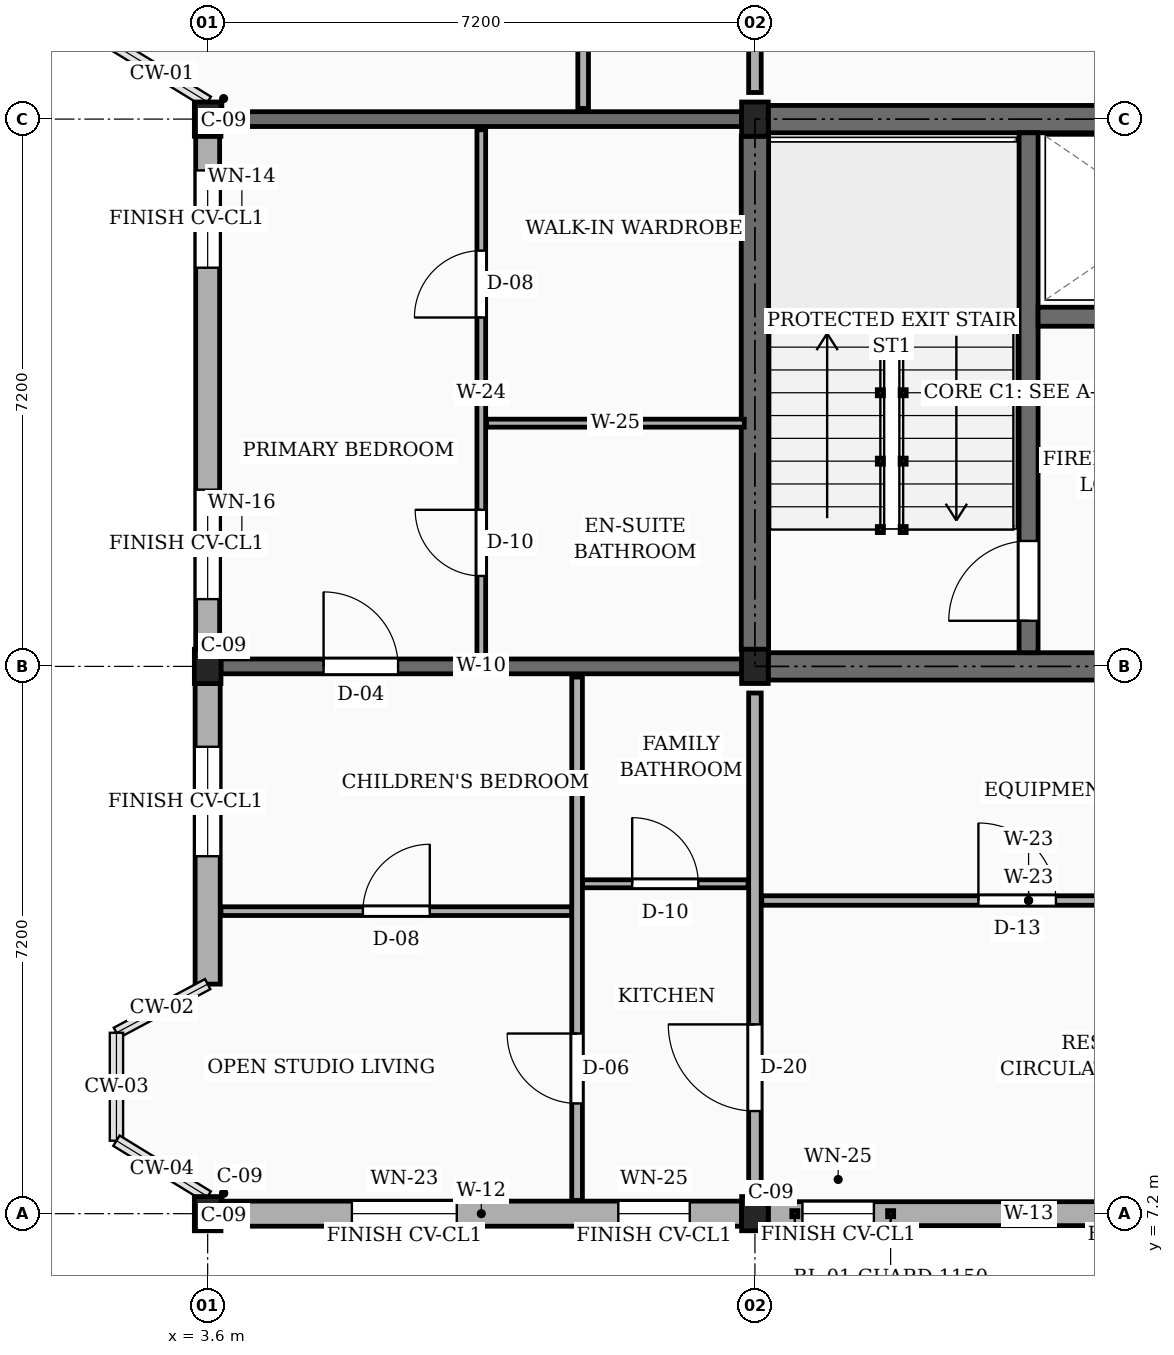
"""IFC4 building model, lengths in metres.
Left out: names, types, materials, properties, quantities, classifications, styles, units other than length and angle.
Written with IfcOpenShell. Run it as: python <this file> out.ifc"""

import sys

from ifc_helpers import new_model, si_unit, direction, frame, frame_2d, origin, origin_2d, place, context, subcontext, project, spatial, rectangle, extrude, element, fill, save


model = new_model("IFC4")
c1 = context("Model", 3, precision=1e-05, world=origin(), true_north=direction((0.0, 1.0)))
c2 = subcontext(c1, "Body", "Model", "MODEL_VIEW")
j1 = project(units=[si_unit("LENGTHUNIT", "METRE"), si_unit("PLANEANGLEUNIT", "RADIAN")], contexts=[c1])
p1 = place(None, origin())
s1 = spatial("IfcSite", under=j1, at=p1, CompositionType="ELEMENT")
p2 = place(p1, origin())
s2 = spatial("IfcBuilding", under=s1, at=p2, CompositionType="ELEMENT")
p3 = place(p2, frame((0.0, 0.0, 45.45)))
s3 = spatial("IfcBuildingStorey", under=s2, at=p3, CompositionType="ELEMENT", Elevation=45.45)
for number, where, z_axis, x_axis in (
    (1, (3.6, 7.2, 0.0), (0.0, 0.0, 1.0), (1.0, 0.0, 0.0)),
    (2, (3.6, 14.4, 0.0), (0.0, 0.0, 1.0), (1.0, 0.0, 0.0)),
    (3, (3.6, 21.6, 0.0), (0.0, 0.0, 1.0), (1.0, 0.0, 0.0)),
    (4, (10.8, 7.2, 0.0), (0.0, 0.0, 1.0), (1.0, 0.0, 0.0)),
    (5, (10.8, 14.4, 0.0), (0.0, 0.0, 1.0), (1.0, 0.0, 0.0)),
    (6, (10.8, 21.6, 0.0), (0.0, 0.0, 1.0), (1.0, 0.0, 0.0)),
):
    element("IfcColumn", number, at=place(p3, frame(where, z_axis=z_axis, x_axis=x_axis)), inside=s3, PredefinedType="COLUMN", context=c2, shape_type="SweptSolid", body=[
        extrude(rectangle(XDim=0.35, YDim=0.45, at=origin_2d()), origin(), (0.0, 0.0, 1.0), 3.15),
    ])
p4 = place(p3, frame((3.775, 14.4, 0.0), z_axis=(0.0, 0.0, 1.0), x_axis=(1.0, 0.0, 0.0)))
e7 = element("IfcWall", 7, at=p4, inside=s3, PredefinedType="SOLIDWALL", context=c2, shape_type="SweptSolid", body=[
    extrude(rectangle(XDim=6.85, YDim=0.195, at=frame_2d((3.425, 0.0))), origin(), (0.0, 0.0, 1.0), 2.17),
])
p5 = place(p4, frame((1.35, 0.0, 0.0)))
e8 = element("IfcOpeningElement", 8, at=p5, cuts=e7, PredefinedType="OPENING", context=c2, shape_type="SweptSolid", body=[
    extrude(rectangle(XDim=0.98, YDim=2.12, at=frame_2d((0.49, 1.06))), frame((0.0, 0.107, 0.0), z_axis=(0.0, -1.0, 0.0), x_axis=(1.0, 0.0, 0.0)), (0.0, 0.0, 1.0), 0.215),
])
p6 = place(p3, frame((3.775, 21.6, 0.0), z_axis=(0.0, 0.0, 1.0), x_axis=(1.0, 0.0, 0.0)))
e9 = element("IfcWall", 9, at=p6, inside=s3, PredefinedType="SOLIDWALL", context=c2, shape_type="SweptSolid", body=[
    extrude(rectangle(XDim=6.85, YDim=0.195, at=frame_2d((3.425, 0.0))), origin(), (0.0, 0.0, 1.0), 2.17),
])
p7 = place(p3, frame((3.775, 7.2, 0.0), z_axis=(0.0, 0.0, 1.0), x_axis=(1.0, 0.0, 0.0)))
e10 = element("IfcWall", 10, at=p7, inside=s3, PredefinedType="SOLIDWALL", context=c2, shape_type="SweptSolid", body=[
    extrude(rectangle(XDim=6.85, YDim=0.33, at=frame_2d((3.425, 0.0))), origin(), (0.0, 0.0, 1.0), 2.44),
])
p8 = place(p7, frame((1.722, 0.0, 0.78)))
e11 = element("IfcOpeningElement", 11, at=p8, cuts=e10, PredefinedType="OPENING", context=c2, shape_type="SweptSolid", body=[
    extrude(rectangle(XDim=1.38, YDim=1.36, at=frame_2d((0.69, 0.68))), frame((0.0, 0.175, 0.0), z_axis=(0.0, -1.0, 0.0), x_axis=(1.0, 0.0, 0.0)), (0.0, 0.0, 1.0), 0.35),
])
p9 = place(p7, frame((5.228, 0.0, 0.78)))
e12 = element("IfcOpeningElement", 12, at=p9, cuts=e10, PredefinedType="OPENING", context=c2, shape_type="SweptSolid", body=[
    extrude(rectangle(XDim=0.94, YDim=1.44, at=frame_2d((0.47, 0.72))), frame((0.0, 0.175, 0.0), z_axis=(0.0, -1.0, 0.0), x_axis=(1.0, 0.0, 0.0)), (0.0, 0.0, 1.0), 0.35),
])
p10 = place(p3, frame((10.975, 7.2, 0.0), z_axis=(0.0, 0.0, 1.0), x_axis=(1.0, 0.0, 0.0)))
e13 = element("IfcWall", 13, at=p10, inside=s3, PredefinedType="SOLIDWALL", context=c2, shape_type="SweptSolid", body=[
    extrude(rectangle(XDim=6.85, YDim=0.315, at=frame_2d((3.425, 0.0))), origin(), (0.0, 0.0, 1.0), 2.44),
])
p11 = place(p10, frame((0.45, 0.0, 0.78)))
e14 = element("IfcOpeningElement", 14, at=p11, cuts=e13, PredefinedType="OPENING", context=c2, shape_type="SweptSolid", body=[
    extrude(rectangle(XDim=0.94, YDim=1.44, at=frame_2d((0.47, 0.72))), frame((0.0, 0.167, 0.0), z_axis=(0.0, -1.0, 0.0), x_axis=(1.0, 0.0, 0.0)), (0.0, 0.0, 1.0), 0.335),
])
p12 = place(p10, frame((4.65, 0.0, 0.78)))
e15 = element("IfcOpeningElement", 15, at=p12, cuts=e13, PredefinedType="OPENING", context=c2, shape_type="SweptSolid", body=[
    extrude(rectangle(XDim=1.15, YDim=1.44, at=frame_2d((0.575, 0.72))), frame((0.0, 0.167, 0.0), z_axis=(0.0, -1.0, 0.0), x_axis=(1.0, 0.0, 0.0)), (0.0, 0.0, 1.0), 0.335),
])
p13 = place(p3, frame((3.6, 21.375, 0.0), z_axis=(0.0, 0.0, 1.0), x_axis=(0.0, -1.0, 0.0)))
e16 = element("IfcWall", 16, at=p13, inside=s3, PredefinedType="SOLIDWALL", context=c2, shape_type="SweptSolid", body=[
    extrude(rectangle(XDim=6.75, YDim=0.315, at=frame_2d((3.375, 0.0))), origin(), (0.0, 0.0, 1.0), 2.44),
])
p14 = place(p13, frame((0.45, 0.0, 0.78)))
e17 = element("IfcOpeningElement", 17, at=p14, cuts=e16, PredefinedType="OPENING", context=c2, shape_type="SweptSolid", body=[
    extrude(rectangle(XDim=1.28, YDim=1.26, at=frame_2d((0.64, 0.63))), frame((0.0, 0.167, 0.0), z_axis=(0.0, -1.0, 0.0), x_axis=(1.0, 0.0, 0.0)), (0.0, 0.0, 1.0), 0.335),
])
p15 = place(p13, frame((4.65, 0.0, 0.78)))
e18 = element("IfcOpeningElement", 18, at=p15, cuts=e16, PredefinedType="OPENING", context=c2, shape_type="SweptSolid", body=[
    extrude(rectangle(XDim=1.44, YDim=1.26, at=frame_2d((0.72, 0.63))), frame((0.0, 0.167, 0.0), z_axis=(0.0, -1.0, 0.0), x_axis=(1.0, 0.0, 0.0)), (0.0, 0.0, 1.0), 0.335),
])
p16 = place(p3, frame((3.6, 14.175, 0.0), z_axis=(0.0, 0.0, 1.0), x_axis=(0.0, -1.0, 0.0)))
e19 = element("IfcWall", 19, at=p16, inside=s3, PredefinedType="SOLIDWALL", context=c2, shape_type="SweptSolid", body=[
    extrude(rectangle(XDim=3.955, YDim=0.33, at=frame_2d((1.978, 0.0))), origin(), (0.0, 0.0, 1.0), 2.44),
])
p17 = place(p16, frame((0.833, 0.0, 0.78)))
e20 = element("IfcOpeningElement", 20, at=p17, cuts=e19, PredefinedType="OPENING", context=c2, shape_type="SweptSolid", body=[
    extrude(rectangle(XDim=1.44, YDim=1.26, at=frame_2d((0.72, 0.63))), frame((0.0, 0.175, 0.0), z_axis=(0.0, -1.0, 0.0), x_axis=(1.0, 0.0, 0.0)), (0.0, 0.0, 1.0), 0.35),
])
p18 = place(p3, frame((10.8, 14.625, 0.0), z_axis=(0.0, 0.0, 1.0), x_axis=(0.0, 1.0, 0.0)))
e21 = element("IfcWall", 21, at=p18, inside=s3, PredefinedType="SHEAR", context=c2, shape_type="SweptSolid", body=[
    extrude(rectangle(XDim=6.75, YDim=0.36, at=frame_2d((3.375, 0.0))), origin(), (0.0, 0.0, 1.0), 2.87),
])
for number, where, z_axis, x_axis in (
    (22, (10.975, 21.6, 0.0), (0.0, 0.0, 1.0), (1.0, 0.0, 0.0)),
    (23, (10.975, 14.4, 0.0), (0.0, 0.0, 1.0), (1.0, 0.0, 0.0)),
):
    element("IfcWall", number, at=place(p3, frame(where, z_axis=z_axis, x_axis=x_axis)), inside=s3, PredefinedType="SHEAR", context=c2, shape_type="SweptSolid", body=[
        extrude(rectangle(XDim=6.85, YDim=0.36, at=frame_2d((3.425, 0.0))), origin(), (0.0, 0.0, 1.0), 2.87),
    ])
p19 = place(p3, frame((14.4, 14.58, 0.0), z_axis=(0.0, 0.0, 1.0), x_axis=(0.0, 1.0, 0.0)))
e24 = element("IfcWall", 24, at=p19, inside=s3, PredefinedType="SHEAR", context=c2, shape_type="SweptSolid", body=[
    extrude(rectangle(XDim=6.84, YDim=0.25, at=frame_2d((3.42, 0.0))), origin(), (0.0, 0.0, 1.0), 2.87),
])
p20 = place(p19, frame((0.42, 0.0, 0.0)))
e25 = element("IfcOpeningElement", 25, at=p20, cuts=e24, PredefinedType="OPENING", context=c2, shape_type="SweptSolid", body=[
    extrude(rectangle(XDim=1.05, YDim=2.15, at=frame_2d((0.525, 1.075))), frame((0.0, 0.135, 0.0), z_axis=(0.0, -1.0, 0.0), x_axis=(1.0, 0.0, 0.0)), (0.0, 0.0, 1.0), 0.27),
])
p21 = place(p3, frame((14.525, 19.0, 0.0), z_axis=(0.0, 0.0, 1.0), x_axis=(1.0, 0.0, 0.0)))
e26 = element("IfcWall", 26, at=p21, inside=s3, PredefinedType="SHEAR", context=c2, shape_type="SweptSolid", body=[
    extrude(rectangle(XDim=3.295, YDim=0.25, at=frame_2d((1.647, 0.0))), origin(), (0.0, 0.0, 1.0), 2.87),
])
p22 = place(p21, frame((1.1, 0.0, 0.0)))
e27 = element("IfcOpeningElement", 27, at=p22, cuts=e26, PredefinedType="OPENING", context=c2, shape_type="SweptSolid", body=[
    extrude(rectangle(XDim=1.1, YDim=2.2, at=frame_2d((0.55, 1.1))), frame((0.0, 0.135, 0.0), z_axis=(0.0, -1.0, 0.0), x_axis=(1.0, 0.0, 0.0)), (0.0, 0.0, 1.0), 0.27),
])
p23 = place(p3, frame((10.8, 7.55, 0.0), z_axis=(0.0, 0.0, 1.0), x_axis=(0.0, 1.0, 0.0)))
e28 = element("IfcWall", 28, at=p23, inside=s3, PredefinedType="PARTITIONING", context=c2, shape_type="SweptSolid", body=[
    extrude(rectangle(XDim=6.5, YDim=0.165, at=frame_2d((3.25, 0.0))), origin(), (0.0, 0.0, 1.0), 2.305),
])
p24 = place(p23, frame((1.0, 0.0, 0.0)))
e29 = element("IfcOpeningElement", 29, at=p24, cuts=e28, PredefinedType="OPENING", context=c2, shape_type="SweptSolid", body=[
    extrude(rectangle(XDim=1.14, YDim=2.18, at=frame_2d((0.57, 1.09))), frame((0.0, 0.093, 0.0), z_axis=(0.0, -1.0, 0.0), x_axis=(1.0, 0.0, 0.0)), (0.0, 0.0, 1.0), 0.185),
])
p25 = place(p3, frame((10.8, 21.95, 0.0), z_axis=(0.0, 0.0, 1.0), x_axis=(0.0, 1.0, 0.0)))
e30 = element("IfcWall", 30, at=p25, inside=s3, PredefinedType="PARTITIONING", context=c2, shape_type="SweptSolid", body=[
    extrude(rectangle(XDim=6.5, YDim=0.165, at=frame_2d((3.25, 0.0))), origin(), (0.0, 0.0, 1.0), 2.305),
])
p26 = place(p25, frame((1.0, 0.0, 0.0)))
e31 = element("IfcOpeningElement", 31, at=p26, cuts=e30, PredefinedType="OPENING", context=c2, shape_type="SweptSolid", body=[
    extrude(rectangle(XDim=1.0, YDim=2.15, at=frame_2d((0.5, 1.075))), frame((0.0, 0.093, 0.0), z_axis=(0.0, -1.0, 0.0), x_axis=(1.0, 0.0, 0.0)), (0.0, 0.0, 1.0), 0.185),
])
p27 = place(p3, frame((10.89, 11.32, 0.0), z_axis=(0.0, 0.0, 1.0), x_axis=(1.0, 0.0, 0.0)))
e32 = element("IfcWall", 32, at=p27, inside=s3, PredefinedType="PARTITIONING", context=c2, shape_type="SweptSolid", body=[
    extrude(rectangle(XDim=7.02, YDim=0.125, at=frame_2d((3.51, 0.0))), origin(), (0.0, 0.0, 1.0), 2.305),
])
p28 = place(p27, frame((2.85, 0.0, 0.0)))
e33 = element("IfcOpeningElement", 33, at=p28, cuts=e32, PredefinedType="OPENING", context=c2, shape_type="SweptSolid", body=[
    extrude(rectangle(XDim=1.02, YDim=2.15, at=frame_2d((0.51, 1.075))), frame((0.0, 0.073, 0.0), z_axis=(0.0, -1.0, 0.0), x_axis=(1.0, 0.0, 0.0)), (0.0, 0.0, 1.0), 0.145),
])
p29 = place(p3, frame((3.775, 11.18, 0.0), z_axis=(0.0, 0.0, 1.0), x_axis=(1.0, 0.0, 0.0)))
e34 = element("IfcWall", 34, at=p29, inside=s3, PredefinedType="PARTITIONING", context=c2, shape_type="SweptSolid", body=[
    extrude(rectangle(XDim=4.615, YDim=0.115, at=frame_2d((2.308, 0.0))), origin(), (0.0, 0.0, 1.0), 2.305),
])
p30 = place(p29, frame((1.867, 0.0, 0.0)))
e35 = element("IfcOpeningElement", 35, at=p30, cuts=e34, PredefinedType="OPENING", context=c2, shape_type="SweptSolid", body=[
    extrude(rectangle(XDim=0.88, YDim=2.08, at=frame_2d((0.44, 1.04))), frame((0.0, 0.067, 0.0), z_axis=(0.0, -1.0, 0.0), x_axis=(1.0, 0.0, 0.0)), (0.0, 0.0, 1.0), 0.135),
])
p31 = place(p3, frame((8.53, 11.54, 0.0), z_axis=(0.0, 0.0, 1.0), x_axis=(1.0, 0.0, 0.0)))
e36 = element("IfcWall", 36, at=p31, inside=s3, PredefinedType="PARTITIONING", context=c2, shape_type="SweptSolid", body=[
    extrude(rectangle(XDim=2.18, YDim=0.105, at=frame_2d((1.09, 0.0))), origin(), (0.0, 0.0, 1.0), 2.305),
])
p32 = place(p31, frame((0.655, 0.0, 0.0)))
e37 = element("IfcOpeningElement", 37, at=p32, cuts=e36, PredefinedType="OPENING", context=c2, shape_type="SweptSolid", body=[
    extrude(rectangle(XDim=0.87, YDim=2.05, at=frame_2d((0.435, 1.025))), frame((0.0, 0.062, 0.0), z_axis=(0.0, -1.0, 0.0), x_axis=(1.0, 0.0, 0.0)), (0.0, 0.0, 1.0), 0.125),
])
p33 = place(p3, frame((8.46, 7.375, 0.0), z_axis=(0.0, 0.0, 1.0), x_axis=(0.0, 1.0, 0.0)))
e38 = element("IfcWall", 38, at=p33, inside=s3, PredefinedType="PARTITIONING", context=c2, shape_type="SweptSolid", body=[
    extrude(rectangle(XDim=6.885, YDim=0.14, at=frame_2d((3.442, 0.0))), origin(), (0.0, 0.0, 1.0), 2.305),
])
p34 = place(p33, frame((1.275, 0.0, 0.0)))
e39 = element("IfcOpeningElement", 39, at=p34, cuts=e38, PredefinedType="OPENING", context=c2, shape_type="SweptSolid", body=[
    extrude(rectangle(XDim=0.92, YDim=2.1, at=frame_2d((0.46, 1.05))), frame((0.0, 0.08, 0.0), z_axis=(0.0, -1.0, 0.0), x_axis=(1.0, 0.0, 0.0)), (0.0, 0.0, 1.0), 0.16),
])
p35 = place(p3, frame((7.2, 14.54, 0.0), z_axis=(0.0, 0.0, 1.0), x_axis=(0.0, 1.0, 0.0)))
e40 = element("IfcWall", 40, at=p35, inside=s3, PredefinedType="PARTITIONING", context=c2, shape_type="SweptSolid", body=[
    extrude(rectangle(XDim=6.92, YDim=0.115, at=frame_2d((3.46, 0.0))), origin(), (0.0, 0.0, 1.0), 2.305),
])
p36 = place(p35, frame((1.05, 0.0, 0.0)))
e41 = element("IfcOpeningElement", 41, at=p36, cuts=e40, PredefinedType="OPENING", context=c2, shape_type="SweptSolid", body=[
    extrude(rectangle(XDim=0.87, YDim=2.05, at=frame_2d((0.435, 1.025))), frame((0.0, 0.067, 0.0), z_axis=(0.0, -1.0, 0.0), x_axis=(1.0, 0.0, 0.0)), (0.0, 0.0, 1.0), 0.135),
])
p37 = place(p35, frame((4.45, 0.0, 0.0)))
e42 = element("IfcOpeningElement", 42, at=p37, cuts=e40, PredefinedType="OPENING", context=c2, shape_type="SweptSolid", body=[
    extrude(rectangle(XDim=0.88, YDim=2.08, at=frame_2d((0.44, 1.04))), frame((0.0, 0.067, 0.0), z_axis=(0.0, -1.0, 0.0), x_axis=(1.0, 0.0, 0.0)), (0.0, 0.0, 1.0), 0.135),
])
p38 = place(p3, frame((7.27, 17.6, 0.0), z_axis=(0.0, 0.0, 1.0), x_axis=(1.0, 0.0, 0.0)))
e43 = element("IfcWall", 43, at=p38, inside=s3, PredefinedType="PARTITIONING", context=c2, shape_type="SweptSolid", body=[
    extrude(rectangle(XDim=3.39, YDim=0.105, at=frame_2d((1.695, 0.0))), origin(), (0.0, 0.0, 1.0), 2.305),
])
p39 = place(p3, frame((8.54, 21.74, 0.0), z_axis=(0.0, 0.0, 1.0), x_axis=(0.0, 1.0, 0.0)))
e44 = element("IfcWall", 44, at=p39, inside=s3, PredefinedType="PARTITIONING", context=c2, shape_type="SweptSolid", body=[
    extrude(rectangle(XDim=6.92, YDim=0.14, at=frame_2d((3.46, 0.0))), origin(), (0.0, 0.0, 1.0), 2.305),
])
p40 = place(p39, frame((1.31, 0.0, 0.0)))
e45 = element("IfcOpeningElement", 45, at=p40, cuts=e44, PredefinedType="OPENING", context=c2, shape_type="SweptSolid", body=[
    extrude(rectangle(XDim=0.95, YDim=2.1, at=frame_2d((0.475, 1.05))), frame((0.0, 0.08, 0.0), z_axis=(0.0, -1.0, 0.0), x_axis=(1.0, 0.0, 0.0)), (0.0, 0.0, 1.0), 0.16),
])
p41 = place(p8, origin())
e46 = element("IfcWindow", 46, at=p41, inside=s3, PartitioningType="SINGLE_PANEL", PredefinedType="WINDOW", context=c2, shape_type="SweptSolid", body=[
    extrude(rectangle(XDim=1.38, YDim=1.36, at=frame_2d((0.69, 0.68))), frame((0.0, 0.03, 0.0), z_axis=(0.0, -1.0, 0.0), x_axis=(1.0, 0.0, 0.0)), (0.0, 0.0, 1.0), 0.06),
])
fill(e11, e46)
p42 = place(p9, origin())
e47 = element("IfcWindow", 47, at=p42, inside=s3, PartitioningType="SINGLE_PANEL", PredefinedType="WINDOW", context=c2, shape_type="SweptSolid", body=[
    extrude(rectangle(XDim=0.94, YDim=1.44, at=frame_2d((0.47, 0.72))), frame((0.0, 0.03, 0.0), z_axis=(0.0, -1.0, 0.0), x_axis=(1.0, 0.0, 0.0)), (0.0, 0.0, 1.0), 0.06),
])
fill(e12, e47)
p43 = place(p11, origin())
e48 = element("IfcWindow", 48, at=p43, inside=s3, PartitioningType="SINGLE_PANEL", PredefinedType="WINDOW", context=c2, shape_type="SweptSolid", body=[
    extrude(rectangle(XDim=0.94, YDim=1.44, at=frame_2d((0.47, 0.72))), frame((0.0, 0.03, 0.0), z_axis=(0.0, -1.0, 0.0), x_axis=(1.0, 0.0, 0.0)), (0.0, 0.0, 1.0), 0.06),
])
fill(e14, e48)
p44 = place(p14, origin())
e49 = element("IfcWindow", 49, at=p44, inside=s3, PartitioningType="SINGLE_PANEL", PredefinedType="WINDOW", context=c2, shape_type="SweptSolid", body=[
    extrude(rectangle(XDim=1.28, YDim=1.26, at=frame_2d((0.64, 0.63))), frame((0.0, 0.03, 0.0), z_axis=(0.0, -1.0, 0.0), x_axis=(1.0, 0.0, 0.0)), (0.0, 0.0, 1.0), 0.06),
])
fill(e17, e49)
p45 = place(p15, origin())
e50 = element("IfcWindow", 50, at=p45, inside=s3, PartitioningType="SINGLE_PANEL", PredefinedType="WINDOW", context=c2, shape_type="SweptSolid", body=[
    extrude(rectangle(XDim=1.44, YDim=1.26, at=frame_2d((0.72, 0.63))), frame((0.0, 0.03, 0.0), z_axis=(0.0, -1.0, 0.0), x_axis=(1.0, 0.0, 0.0)), (0.0, 0.0, 1.0), 0.06),
])
fill(e18, e50)
p46 = place(p17, origin())
e51 = element("IfcWindow", 51, at=p46, inside=s3, PartitioningType="SINGLE_PANEL", PredefinedType="WINDOW", context=c2, shape_type="SweptSolid", body=[
    extrude(rectangle(XDim=1.44, YDim=1.26, at=frame_2d((0.72, 0.63))), frame((0.0, 0.03, 0.0), z_axis=(0.0, -1.0, 0.0), x_axis=(1.0, 0.0, 0.0)), (0.0, 0.0, 1.0), 0.06),
])
fill(e20, e51)
p47 = place(p20, origin())
e52 = element("IfcDoor", 52, at=p47, inside=s3, OperationType="SINGLE_SWING_LEFT", PredefinedType="DOOR", context=c2, shape_type="SweptSolid", body=[
    extrude(rectangle(XDim=1.05, YDim=2.15, at=frame_2d((0.525, 1.075))), frame((0.0, 0.025, 0.0), z_axis=(0.0, -1.0, 0.0), x_axis=(1.0, 0.0, 0.0)), (0.0, 0.0, 1.0), 0.05),
])
fill(e25, e52)
p48 = place(p24, origin())
e53 = element("IfcDoor", 53, at=p48, inside=s3, OperationType="SINGLE_SWING_RIGHT", PredefinedType="DOOR", context=c2, shape_type="SweptSolid", body=[
    extrude(rectangle(XDim=1.14, YDim=2.18, at=frame_2d((0.57, 1.09))), frame((0.0, 0.025, 0.0), z_axis=(0.0, -1.0, 0.0), x_axis=(1.0, 0.0, 0.0)), (0.0, 0.0, 1.0), 0.05),
])
fill(e29, e53)
p49 = place(p28, origin())
e54 = element("IfcDoor", 54, at=p49, inside=s3, OperationType="SINGLE_SWING_LEFT", PredefinedType="DOOR", context=c2, shape_type="SweptSolid", body=[
    extrude(rectangle(XDim=1.02, YDim=2.15, at=frame_2d((0.51, 1.075))), frame((0.0, 0.025, 0.0), z_axis=(0.0, -1.0, 0.0), x_axis=(1.0, 0.0, 0.0)), (0.0, 0.0, 1.0), 0.05),
])
fill(e33, e54)
p50 = place(p30, origin())
e55 = element("IfcDoor", 55, at=p50, inside=s3, OperationType="SINGLE_SWING_RIGHT", PredefinedType="DOOR", context=c2, shape_type="SweptSolid", body=[
    extrude(rectangle(XDim=0.88, YDim=2.08, at=frame_2d((0.44, 1.04))), frame((0.0, 0.025, 0.0), z_axis=(0.0, -1.0, 0.0), x_axis=(1.0, 0.0, 0.0)), (0.0, 0.0, 1.0), 0.05),
])
fill(e35, e55)
p51 = place(p32, origin())
e56 = element("IfcDoor", 56, at=p51, inside=s3, OperationType="SINGLE_SWING_LEFT", PredefinedType="DOOR", context=c2, shape_type="SweptSolid", body=[
    extrude(rectangle(XDim=0.87, YDim=2.05, at=frame_2d((0.435, 1.025))), frame((0.0, 0.025, 0.0), z_axis=(0.0, -1.0, 0.0), x_axis=(1.0, 0.0, 0.0)), (0.0, 0.0, 1.0), 0.05),
])
fill(e37, e56)
p52 = place(p34, origin())
e57 = element("IfcDoor", 57, at=p52, inside=s3, OperationType="SINGLE_SWING_RIGHT", PredefinedType="DOOR", context=c2, shape_type="SweptSolid", body=[
    extrude(rectangle(XDim=0.92, YDim=2.1, at=frame_2d((0.46, 1.05))), frame((0.0, 0.025, 0.0), z_axis=(0.0, -1.0, 0.0), x_axis=(1.0, 0.0, 0.0)), (0.0, 0.0, 1.0), 0.05),
])
fill(e39, e57)
p53 = place(p36, origin())
e58 = element("IfcDoor", 58, at=p53, inside=s3, OperationType="SINGLE_SWING_RIGHT", PredefinedType="DOOR", context=c2, shape_type="SweptSolid", body=[
    extrude(rectangle(XDim=0.87, YDim=2.05, at=frame_2d((0.435, 1.025))), frame((0.0, 0.025, 0.0), z_axis=(0.0, -1.0, 0.0), x_axis=(1.0, 0.0, 0.0)), (0.0, 0.0, 1.0), 0.05),
])
fill(e41, e58)
p54 = place(p37, origin())
e59 = element("IfcDoor", 59, at=p54, inside=s3, OperationType="SINGLE_SWING_LEFT", PredefinedType="DOOR", context=c2, shape_type="SweptSolid", body=[
    extrude(rectangle(XDim=0.88, YDim=2.08, at=frame_2d((0.44, 1.04))), frame((0.0, 0.025, 0.0), z_axis=(0.0, -1.0, 0.0), x_axis=(1.0, 0.0, 0.0)), (0.0, 0.0, 1.0), 0.05),
])
fill(e42, e59)
p55 = place(p5, origin())
e60 = element("IfcDoor", 60, at=p55, inside=s3, OperationType="SINGLE_SWING_LEFT", PredefinedType="DOOR", context=c2, shape_type="SweptSolid", body=[
    extrude(rectangle(XDim=0.98, YDim=2.12, at=frame_2d((0.49, 1.06))), frame((0.0, 0.025, 0.0), z_axis=(0.0, -1.0, 0.0), x_axis=(1.0, 0.0, 0.0)), (0.0, 0.0, 1.0), 0.05),
])
fill(e8, e60)
save(model, sys.argv[1])
